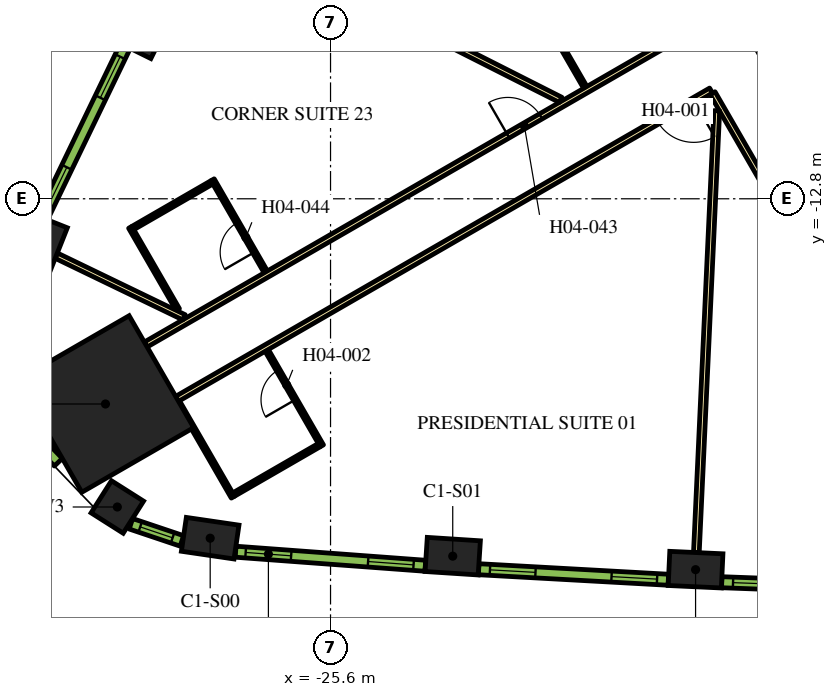
"""IFC4 building model, lengths in metres.
Left out: names, types, materials, properties, quantities, classifications, styles, units other than length and angle.
Written with IfcOpenShell. Run it as: python <this file> out.ifc"""

import sys

from ifc_helpers import new_model, si_unit, direction, frame, frame_2d, origin, origin_2d, place, context, subcontext, project, spatial, rectangle, extrude, element, fill, save


model = new_model("IFC4")
c1 = context("Model", 3, precision=1e-05, world=origin(), true_north=direction((0.0, 1.0)))
c2 = subcontext(c1, "Body", "Model", "MODEL_VIEW")
j1 = project(units=[si_unit("LENGTHUNIT", "METRE"), si_unit("PLANEANGLEUNIT", "RADIAN")], contexts=[c1])
p1 = place(None, origin())
s1 = spatial("IfcSite", under=j1, at=p1, CompositionType="ELEMENT")
p2 = place(p1, origin())
s2 = spatial("IfcBuilding", under=s1, at=p2, CompositionType="ELEMENT")
p3 = place(p2, frame((0.0, 0.0, 70.5)))
s3 = spatial("IfcBuildingStorey", under=s2, at=p3, CompositionType="ELEMENT", Elevation=70.5)
p4 = place(p3, frame((-31.522, -18.199, 0.0), z_axis=(0.0, 0.0, 1.0), x_axis=(-0.866025403784, -0.5, 0.0)))
e1 = element("IfcColumn", 1, at=p4, inside=s3, PredefinedType="COLUMN", context=c2, shape_type="SweptSolid", body=[
    extrude(rectangle(XDim=3.4, YDim=3.4, at=origin_2d()), origin(), (0.0, 0.0, 1.0), 3.9),
])
for number, where, z_axis, x_axis in (
    (2, (-28.767, -21.731, 0.0), (0.0, 0.0, 1.0), (0.989, -0.145, 0.0)),
    (3, (-22.385, -22.204, 0.0), (0.0, 0.0, 1.0), (0.998, -0.065, 0.0)),
    (4, (-15.994, -22.558, 0.0), (0.0, 0.0, 1.0), (0.999, -0.046, 0.0)),
    (5, (-30.421, -8.284, 0.0), (0.0, 0.0, 1.0), (-0.443, -0.897, 0.0)),
    (6, (-33.203, -14.047, 0.0), (0.0, 0.0, 1.0), (-0.369, -0.929, 0.0)),
):
    element("IfcColumn", number, at=place(p3, frame(where, z_axis=z_axis, x_axis=x_axis)), inside=s3, PredefinedType="COLUMN", context=c2, shape_type="SweptSolid", body=[
        extrude(rectangle(XDim=1.4, YDim=0.9, at=origin_2d()), origin(), (0.0, 0.0, 1.0), 3.9),
    ])
p5 = place(p3, frame((-31.21, -20.91, 0.0), z_axis=(0.0, 0.0, 1.0), x_axis=(0.844485001826, -0.535579202071, 0.0)))
e7 = element("IfcColumn", 7, at=p5, inside=s3, PredefinedType="COLUMN", context=c2, shape_type="SweptSolid", body=[
    extrude(rectangle(XDim=1.0, YDim=1.0, at=origin_2d()), origin(), (0.0, 0.0, 1.0), 3.9),
])
p6 = place(p3, frame((-12.134, -11.883, 0.0), z_axis=(0.0, 0.0, 1.0), x_axis=(-0.500005339912, 0.866022320763, 0.0)))
e8 = element("IfcWall", 8, at=p6, inside=s3, PredefinedType="SOLIDWALL", context=c2, shape_type="SweptSolid", body=[
    extrude(rectangle(XDim=9.488, YDim=0.9, at=frame_2d((4.744, 0.0))), origin(), (0.0, 0.0, 1.0), 3.9),
])
p7 = place(p3, frame((-12.885, -9.431, 0.0), z_axis=(0.0, 0.0, 1.0), x_axis=(-0.500020560727, 0.866013532718, 0.0)))
e9 = element("IfcWall", 9, at=p7, inside=s3, PredefinedType="SOLIDWALL", context=c2, shape_type="SweptSolid", body=[
    extrude(rectangle(XDim=3.45, YDim=0.25, at=frame_2d((1.725, 0.0))), origin(), (0.0, 0.0, 1.0), 3.9),
])
p8 = place(p3, frame((-30.463, -16.635, 0.0), z_axis=(0.0, 0.0, 1.0), x_axis=(0.866022394896, 0.500005211512, 0.0)))
e10 = element("IfcWall", 10, at=p8, inside=s3, PredefinedType="PARTITIONING", context=c2, shape_type="SweptSolid", body=[
    extrude(rectangle(XDim=16.144, YDim=0.15, at=frame_2d((8.072, 0.0))), origin(), (0.0, 0.0, 1.0), 2.75),
])
p9 = place(p8, frame((11.004, 0.0, 0.0)))
e11 = element("IfcOpeningElement", 11, at=p9, cuts=e10, PredefinedType="OPENING", context=c2, shape_type="SweptSolid", body=[
    extrude(rectangle(XDim=1.0, YDim=2.1, at=frame_2d((0.5, 1.05))), frame((0.0, 0.085, 0.0), z_axis=(0.0, -1.0, 0.0), x_axis=(1.0, 0.0, 0.0)), (0.0, 0.0, 1.0), 0.17),
])
p10 = place(p3, frame((-15.587, -9.952, 0.0), z_axis=(0.0, 0.0, 1.0), x_axis=(-0.866022197818, -0.500005552856, 0.0)))
e12 = element("IfcWall", 12, at=p10, inside=s3, PredefinedType="PARTITIONING", context=c2, shape_type="SweptSolid", body=[
    extrude(rectangle(XDim=16.224, YDim=0.15, at=frame_2d((8.112, 0.0))), origin(), (0.0, 0.0, 1.0), 2.75),
])
p11 = place(p10, frame((0.527, 0.0, 0.0)))
e13 = element("IfcOpeningElement", 13, at=p11, cuts=e12, PredefinedType="OPENING", context=c2, shape_type="SweptSolid", body=[
    extrude(rectangle(XDim=1.1, YDim=2.1, at=frame_2d((0.55, 1.05))), frame((0.0, 0.085, 0.0), z_axis=(0.0, -1.0, 0.0), x_axis=(1.0, 0.0, 0.0)), (0.0, 0.0, 1.0), 0.17),
])
p12 = place(p3, frame((-12.918, -14.575, 0.0), z_axis=(0.0, 0.0, 1.0), x_axis=(-0.500009150678, 0.866020120573, 0.0)))
e14 = element("IfcWall", 14, at=p12, inside=s3, PredefinedType="PARTITIONING", context=c2, shape_type="SweptSolid", body=[
    extrude(rectangle(XDim=5.258, YDim=0.15, at=frame_2d((2.629, 0.0))), origin(), (0.0, 0.0, 1.0), 2.75),
])
p13 = place(p3, frame((-32.817, -14.296, 0.0), z_axis=(0.0, 0.0, 1.0), x_axis=(0.900616957918, -0.434613730927, 0.0)))
e15 = element("IfcWall", 15, at=p13, inside=s3, PredefinedType="PARTITIONING", context=c2, shape_type="SweptSolid", body=[
    extrude(rectangle(XDim=3.733, YDim=0.15, at=frame_2d((1.867, 0.0))), origin(), (0.0, 0.0, 1.0), 2.75),
])
p14 = place(p3, frame((-29.12, -5.356, 0.0), z_axis=(0.0, 0.0, 1.0), x_axis=(0.892401965553, -0.451241323327, 0.0)))
e16 = element("IfcWall", 16, at=p14, inside=s3, PredefinedType="PARTITIONING", context=c2, shape_type="SweptSolid", body=[
    extrude(rectangle(XDim=10.729, YDim=0.15, at=frame_2d((5.364, 0.0))), origin(), (0.0, 0.0, 1.0), 2.75),
])
p15 = place(p3, frame((-15.973, -22.109, 0.0), z_axis=(0.0, 0.0, 1.0), x_axis=(0.046191717129, 0.998932592955, 0.0)))
e17 = element("IfcWall", 17, at=p15, inside=s3, PredefinedType="PARTITIONING", context=c2, shape_type="SweptSolid", body=[
    extrude(rectangle(XDim=11.638, YDim=0.15, at=frame_2d((5.819, 0.0))), origin(), (0.0, 0.0, 1.0), 2.75),
])
p16 = place(p3, frame((-25.829, -19.3, 0.0), z_axis=(0.0, 0.0, 1.0), x_axis=(-0.50005036918, 0.865996321171, 0.0)))
e18 = element("IfcWall", 18, at=p16, inside=s3, PredefinedType="PARTITIONING", context=c2, shape_type="SweptSolid", body=[
    extrude(rectangle(XDim=2.9, YDim=0.1, at=frame_2d((1.45, 0.0))), origin(), (0.0, 0.0, 1.0), 2.75),
])
p17 = place(p16, frame((1.4, 0.0, 0.0)))
e19 = element("IfcOpeningElement", 19, at=p17, cuts=e18, PredefinedType="OPENING", context=c2, shape_type="SweptSolid", body=[
    extrude(rectangle(XDim=0.9, YDim=2.1, at=frame_2d((0.45, 1.05))), frame((0.0, 0.06, 0.0), z_axis=(0.0, -1.0, 0.0), x_axis=(1.0, 0.0, 0.0)), (0.0, 0.0, 1.0), 0.12),
])
p18 = place(p3, frame((-25.897, -19.282, 0.0), z_axis=(0.0, 0.0, 1.0), x_axis=(-0.866021400173, -0.500006934395, 0.0)))
e20 = element("IfcWall", 20, at=p18, inside=s3, PredefinedType="PARTITIONING", context=c2, shape_type="SweptSolid", body=[
    extrude(rectangle(XDim=2.6, YDim=0.1, at=frame_2d((1.3, 0.0))), origin(), (0.0, 0.0, 1.0), 2.75),
])
p19 = place(p3, frame((-29.617, -18.139, 0.0), z_axis=(0.0, 0.0, 1.0), x_axis=(0.499987231761, -0.866032775405, 0.0)))
e21 = element("IfcWall", 21, at=p19, inside=s3, PredefinedType="PARTITIONING", context=c2, shape_type="SweptSolid", body=[
    extrude(rectangle(XDim=2.9, YDim=0.1, at=frame_2d((1.45, 0.0))), origin(), (0.0, 0.0, 1.0), 2.75),
])
p20 = place(p3, frame((-20.092, -7.8, 0.0), z_axis=(0.0, 0.0, 1.0), x_axis=(0.499940577336, -0.866059708757, 0.0)))
e22 = element("IfcWall", 22, at=p20, inside=s3, PredefinedType="PARTITIONING", context=c2, shape_type="SweptSolid", body=[
    extrude(rectangle(XDim=2.39, YDim=0.1, at=frame_2d((1.195, 0.0))), origin(), (0.0, 0.0, 1.0), 2.75),
])
p21 = place(p3, frame((-27.304, -14.725, 0.0), z_axis=(0.0, 0.0, 1.0), x_axis=(-0.49998411664, 0.866034573852, 0.0)))
e23 = element("IfcWall", 23, at=p21, inside=s3, PredefinedType="PARTITIONING", context=c2, shape_type="SweptSolid", body=[
    extrude(rectangle(XDim=2.8, YDim=0.1, at=frame_2d((1.4, 0.0))), origin(), (0.0, 0.0, 1.0), 2.75),
])
p22 = place(p21, frame((0.6, 0.0, 0.0)))
e24 = element("IfcOpeningElement", 24, at=p22, cuts=e23, PredefinedType="OPENING", context=c2, shape_type="SweptSolid", body=[
    extrude(rectangle(XDim=0.9, YDim=2.1, at=frame_2d((0.45, 1.05))), frame((0.0, 0.06, 0.0), z_axis=(0.0, -1.0, 0.0), x_axis=(1.0, 0.0, 0.0)), (0.0, 0.0, 1.0), 0.12),
])
p23 = place(p3, frame((-28.722, -12.368, 0.0), z_axis=(0.0, 0.0, 1.0), x_axis=(-0.866050077142, -0.499957262057, 0.0)))
e25 = element("IfcWall", 25, at=p23, inside=s3, PredefinedType="PARTITIONING", context=c2, shape_type="SweptSolid", body=[
    extrude(rectangle(XDim=2.4, YDim=0.1, at=frame_2d((1.2, 0.0))), origin(), (0.0, 0.0, 1.0), 2.75),
])
p24 = place(p3, frame((-29.619, -15.715, 0.0), z_axis=(0.0, 0.0, 1.0), x_axis=(-0.500004234368, 0.866022959057, 0.0)))
e26 = element("IfcWall", 26, at=p24, inside=s3, PredefinedType="PARTITIONING", context=c2, shape_type="SweptSolid", body=[
    extrude(rectangle(XDim=2.5, YDim=0.1, at=frame_2d((1.25, 0.0))), origin(), (0.0, 0.0, 1.0), 2.75),
])
p25 = place(p3, frame((-28.098, -22.086, 0.0), z_axis=(0.0, 0.0, 1.0), x_axis=(0.997266290399, -0.073891447643, 0.0)))
e27 = element("IfcWall", 27, at=p25, inside=s3, PredefinedType="SOLIDWALL", context=c2, shape_type="SweptSolid", body=[
    extrude(rectangle(XDim=5.006, YDim=0.29, at=frame_2d((2.503, 0.0))), origin(), (0.0, 0.0, 1.0), 3.65),
])
p26 = place(p25, frame((0.265, 0.0, 0.9)))
e28 = element("IfcOpeningElement", 28, at=p26, cuts=e27, PredefinedType="OPENING", context=c2, shape_type="SweptSolid", body=[
    extrude(rectangle(XDim=1.2, YDim=2.15, at=frame_2d((0.6, 1.075))), frame((0.0, 0.155, 0.0), z_axis=(0.0, -1.0, 0.0), x_axis=(1.0, 0.0, 0.0)), (0.0, 0.0, 1.0), 0.31),
])
p27 = place(p25, frame((3.496, 0.0, 0.9)))
e29 = element("IfcOpeningElement", 29, at=p27, cuts=e27, PredefinedType="OPENING", context=c2, shape_type="SweptSolid", body=[
    extrude(rectangle(XDim=1.2, YDim=2.15, at=frame_2d((0.6, 1.075))), frame((0.0, 0.155, 0.0), z_axis=(0.0, -1.0, 0.0), x_axis=(1.0, 0.0, 0.0)), (0.0, 0.0, 1.0), 0.31),
])
p28 = place(p3, frame((-21.701, -22.547, 0.0), z_axis=(0.0, 0.0, 1.0), x_axis=(0.998464708705, -0.055391564976, 0.0)))
e30 = element("IfcWall", 30, at=p28, inside=s3, PredefinedType="SOLIDWALL", context=c2, shape_type="SweptSolid", body=[
    extrude(rectangle(XDim=4.998, YDim=0.29, at=frame_2d((2.499, 0.0))), origin(), (0.0, 0.0, 1.0), 3.65),
])
p29 = place(p28, frame((0.297, 0.0, 0.9)))
e31 = element("IfcOpeningElement", 31, at=p29, cuts=e30, PredefinedType="OPENING", context=c2, shape_type="SweptSolid", body=[
    extrude(rectangle(XDim=1.2, YDim=2.15, at=frame_2d((0.6, 1.075))), frame((0.0, 0.155, 0.0), z_axis=(0.0, -1.0, 0.0), x_axis=(1.0, 0.0, 0.0)), (0.0, 0.0, 1.0), 0.31),
])
p30 = place(p28, frame((3.501, 0.0, 0.9)))
e32 = element("IfcOpeningElement", 32, at=p30, cuts=e30, PredefinedType="OPENING", context=c2, shape_type="SweptSolid", body=[
    extrude(rectangle(XDim=1.2, YDim=2.15, at=frame_2d((0.6, 1.075))), frame((0.0, 0.155, 0.0), z_axis=(0.0, -1.0, 0.0), x_axis=(1.0, 0.0, 0.0)), (0.0, 0.0, 1.0), 0.31),
])
p31 = place(p3, frame((-15.305, -22.889, 0.0), z_axis=(0.0, 0.0, 1.0), x_axis=(0.999317974969, -0.036926750529, 0.0)))
e33 = element("IfcWall", 33, at=p31, inside=s3, PredefinedType="SOLIDWALL", context=c2, shape_type="SweptSolid", body=[
    extrude(rectangle(XDim=4.998, YDim=0.29, at=frame_2d((2.499, 0.0))), origin(), (0.0, 0.0, 1.0), 3.65),
])
p32 = place(p31, frame((0.297, 0.0, 0.9)))
e34 = element("IfcOpeningElement", 34, at=p32, cuts=e33, PredefinedType="OPENING", context=c2, shape_type="SweptSolid", body=[
    extrude(rectangle(XDim=1.2, YDim=2.15, at=frame_2d((0.6, 1.075))), frame((0.0, 0.155, 0.0), z_axis=(0.0, -1.0, 0.0), x_axis=(1.0, 0.0, 0.0)), (0.0, 0.0, 1.0), 0.31),
])
p33 = place(p31, frame((3.501, 0.0, 0.9)))
e35 = element("IfcOpeningElement", 35, at=p33, cuts=e33, PredefinedType="OPENING", context=c2, shape_type="SweptSolid", body=[
    extrude(rectangle(XDim=1.2, YDim=2.15, at=frame_2d((0.6, 1.075))), frame((0.0, 0.155, 0.0), z_axis=(0.0, -1.0, 0.0), x_axis=(1.0, 0.0, 0.0)), (0.0, 0.0, 1.0), 0.31),
])
p34 = place(p3, frame((-31.0, -8.782, 0.0), z_axis=(0.0, 0.0, 1.0), x_axis=(-0.434664499056, -0.900592456808, 0.0)))
e36 = element("IfcWall", 36, at=p34, inside=s3, PredefinedType="SOLIDWALL", context=c2, shape_type="SweptSolid", body=[
    extrude(rectangle(XDim=5.006, YDim=0.29, at=frame_2d((2.503, 0.0))), origin(), (0.0, 0.0, 1.0), 3.65),
])
p35 = place(p34, frame((0.31, 0.0, 0.9)))
e37 = element("IfcOpeningElement", 37, at=p35, cuts=e36, PredefinedType="OPENING", context=c2, shape_type="SweptSolid", body=[
    extrude(rectangle(XDim=1.2, YDim=2.15, at=frame_2d((0.6, 1.075))), frame((0.0, 0.155, 0.0), z_axis=(0.0, -1.0, 0.0), x_axis=(1.0, 0.0, 0.0)), (0.0, 0.0, 1.0), 0.31),
])
p36 = place(p34, frame((3.541, 0.0, 0.9)))
e38 = element("IfcOpeningElement", 38, at=p36, cuts=e36, PredefinedType="OPENING", context=c2, shape_type="SweptSolid", body=[
    extrude(rectangle(XDim=1.2, YDim=2.15, at=frame_2d((0.6, 1.075))), frame((0.0, 0.155, 0.0), z_axis=(0.0, -1.0, 0.0), x_axis=(1.0, 0.0, 0.0)), (0.0, 0.0, 1.0), 0.31),
])
p37 = place(p3, frame((-33.291, -19.181, 0.0), z_axis=(0.0, 0.0, 1.0), x_axis=(0.692252359589, -0.721655506903, 0.0)))
e39 = element("IfcWall", 39, at=p37, inside=s3, PredefinedType="SOLIDWALL", context=c2, shape_type="SweptSolid", body=[
    extrude(rectangle(XDim=0.764, YDim=0.29, at=frame_2d((0.382, 0.0))), origin(), (0.0, 0.0, 1.0), 3.65),
])
p38 = place(p3, frame((-30.853, -21.352, 0.0), z_axis=(0.0, 0.0, 1.0), x_axis=(0.947903891592, -0.318556450734, 0.0)))
e40 = element("IfcWall", 40, at=p38, inside=s3, PredefinedType="SOLIDWALL", context=c2, shape_type="SweptSolid", body=[
    extrude(rectangle(XDim=1.415, YDim=0.29, at=frame_2d((0.708, 0.0))), origin(), (0.0, 0.0, 1.0), 3.65),
])
p39 = place(p38, frame((0.257, 0.0, 0.9)))
e41 = element("IfcOpeningElement", 41, at=p39, cuts=e40, PredefinedType="OPENING", context=c2, shape_type="SweptSolid", body=[
    extrude(rectangle(XDim=0.9, YDim=2.15, at=frame_2d((0.45, 1.075))), frame((0.0, 0.155, 0.0), z_axis=(0.0, -1.0, 0.0), x_axis=(1.0, 0.0, 0.0)), (0.0, 0.0, 1.0), 0.31),
])
p40 = place(p11, origin())
e42 = element("IfcDoor", 42, at=p40, inside=s3, OperationType="SINGLE_SWING_LEFT", PredefinedType="DOOR", context=c2, shape_type="SweptSolid", body=[
    extrude(rectangle(XDim=1.1, YDim=2.1, at=frame_2d((0.55, 1.05))), frame((0.0, 0.025, 0.0), z_axis=(0.0, -1.0, 0.0), x_axis=(1.0, 0.0, 0.0)), (0.0, 0.0, 1.0), 0.05),
])
fill(e13, e42)
p41 = place(p17, origin())
e43 = element("IfcDoor", 43, at=p41, inside=s3, OperationType="SINGLE_SWING_LEFT", PredefinedType="DOOR", context=c2, shape_type="SweptSolid", body=[
    extrude(rectangle(XDim=0.9, YDim=2.1, at=frame_2d((0.45, 1.05))), frame((0.0, 0.025, 0.0), z_axis=(0.0, -1.0, 0.0), x_axis=(1.0, 0.0, 0.0)), (0.0, 0.0, 1.0), 0.05),
])
fill(e19, e43)
p42 = place(p9, origin())
e44 = element("IfcDoor", 44, at=p42, inside=s3, OperationType="SINGLE_SWING_RIGHT", PredefinedType="DOOR", context=c2, shape_type="SweptSolid", body=[
    extrude(rectangle(XDim=1.0, YDim=2.1, at=frame_2d((0.5, 1.05))), frame((0.0, 0.025, 0.0), z_axis=(0.0, -1.0, 0.0), x_axis=(1.0, 0.0, 0.0)), (0.0, 0.0, 1.0), 0.05),
])
fill(e11, e44)
p43 = place(p22, origin())
e45 = element("IfcDoor", 45, at=p43, inside=s3, OperationType="SINGLE_SWING_LEFT", PredefinedType="DOOR", context=c2, shape_type="SweptSolid", body=[
    extrude(rectangle(XDim=0.9, YDim=2.1, at=frame_2d((0.45, 1.05))), frame((0.0, 0.025, 0.0), z_axis=(0.0, -1.0, 0.0), x_axis=(1.0, 0.0, 0.0)), (0.0, 0.0, 1.0), 0.05),
])
fill(e24, e45)
p44 = place(p26, origin())
e46 = element("IfcWindow", 46, at=p44, inside=s3, PartitioningType="DOUBLE_PANEL_VERTICAL", PredefinedType="WINDOW", context=c2, shape_type="SweptSolid", body=[
    extrude(rectangle(XDim=1.2, YDim=2.15, at=frame_2d((0.6, 1.075))), frame((0.0, 0.015, 0.0), z_axis=(0.0, -1.0, 0.0), x_axis=(1.0, 0.0, 0.0)), (0.0, 0.0, 1.0), 0.06),
])
fill(e28, e46)
p45 = place(p27, origin())
e47 = element("IfcWindow", 47, at=p45, inside=s3, PartitioningType="DOUBLE_PANEL_VERTICAL", PredefinedType="WINDOW", context=c2, shape_type="SweptSolid", body=[
    extrude(rectangle(XDim=1.2, YDim=2.15, at=frame_2d((0.6, 1.075))), frame((0.0, 0.015, 0.0), z_axis=(0.0, -1.0, 0.0), x_axis=(1.0, 0.0, 0.0)), (0.0, 0.0, 1.0), 0.06),
])
fill(e29, e47)
p46 = place(p29, origin())
e48 = element("IfcWindow", 48, at=p46, inside=s3, PartitioningType="DOUBLE_PANEL_VERTICAL", PredefinedType="WINDOW", context=c2, shape_type="SweptSolid", body=[
    extrude(rectangle(XDim=1.2, YDim=2.15, at=frame_2d((0.6, 1.075))), frame((0.0, 0.015, 0.0), z_axis=(0.0, -1.0, 0.0), x_axis=(1.0, 0.0, 0.0)), (0.0, 0.0, 1.0), 0.06),
])
fill(e31, e48)
p47 = place(p30, origin())
e49 = element("IfcWindow", 49, at=p47, inside=s3, PartitioningType="DOUBLE_PANEL_VERTICAL", PredefinedType="WINDOW", context=c2, shape_type="SweptSolid", body=[
    extrude(rectangle(XDim=1.2, YDim=2.15, at=frame_2d((0.6, 1.075))), frame((0.0, 0.015, 0.0), z_axis=(0.0, -1.0, 0.0), x_axis=(1.0, 0.0, 0.0)), (0.0, 0.0, 1.0), 0.06),
])
fill(e32, e49)
p48 = place(p32, origin())
e50 = element("IfcWindow", 50, at=p48, inside=s3, PartitioningType="DOUBLE_PANEL_VERTICAL", PredefinedType="WINDOW", context=c2, shape_type="SweptSolid", body=[
    extrude(rectangle(XDim=1.2, YDim=2.15, at=frame_2d((0.6, 1.075))), frame((0.0, 0.015, 0.0), z_axis=(0.0, -1.0, 0.0), x_axis=(1.0, 0.0, 0.0)), (0.0, 0.0, 1.0), 0.06),
])
fill(e34, e50)
p49 = place(p35, origin())
e51 = element("IfcWindow", 51, at=p49, inside=s3, PartitioningType="DOUBLE_PANEL_VERTICAL", PredefinedType="WINDOW", context=c2, shape_type="SweptSolid", body=[
    extrude(rectangle(XDim=1.2, YDim=2.15, at=frame_2d((0.6, 1.075))), frame((0.0, 0.015, 0.0), z_axis=(0.0, -1.0, 0.0), x_axis=(1.0, 0.0, 0.0)), (0.0, 0.0, 1.0), 0.06),
])
fill(e37, e51)
p50 = place(p36, origin())
e52 = element("IfcWindow", 52, at=p50, inside=s3, PartitioningType="DOUBLE_PANEL_VERTICAL", PredefinedType="WINDOW", context=c2, shape_type="SweptSolid", body=[
    extrude(rectangle(XDim=1.2, YDim=2.15, at=frame_2d((0.6, 1.075))), frame((0.0, 0.015, 0.0), z_axis=(0.0, -1.0, 0.0), x_axis=(1.0, 0.0, 0.0)), (0.0, 0.0, 1.0), 0.06),
])
fill(e38, e52)
p51 = place(p39, origin())
e53 = element("IfcWindow", 53, at=p51, inside=s3, PartitioningType="SINGLE_PANEL", PredefinedType="WINDOW", context=c2, shape_type="SweptSolid", body=[
    extrude(rectangle(XDim=0.9, YDim=2.15, at=frame_2d((0.45, 1.075))), frame((0.0, 0.015, 0.0), z_axis=(0.0, -1.0, 0.0), x_axis=(1.0, 0.0, 0.0)), (0.0, 0.0, 1.0), 0.06),
])
fill(e41, e53)
save(model, sys.argv[1])
